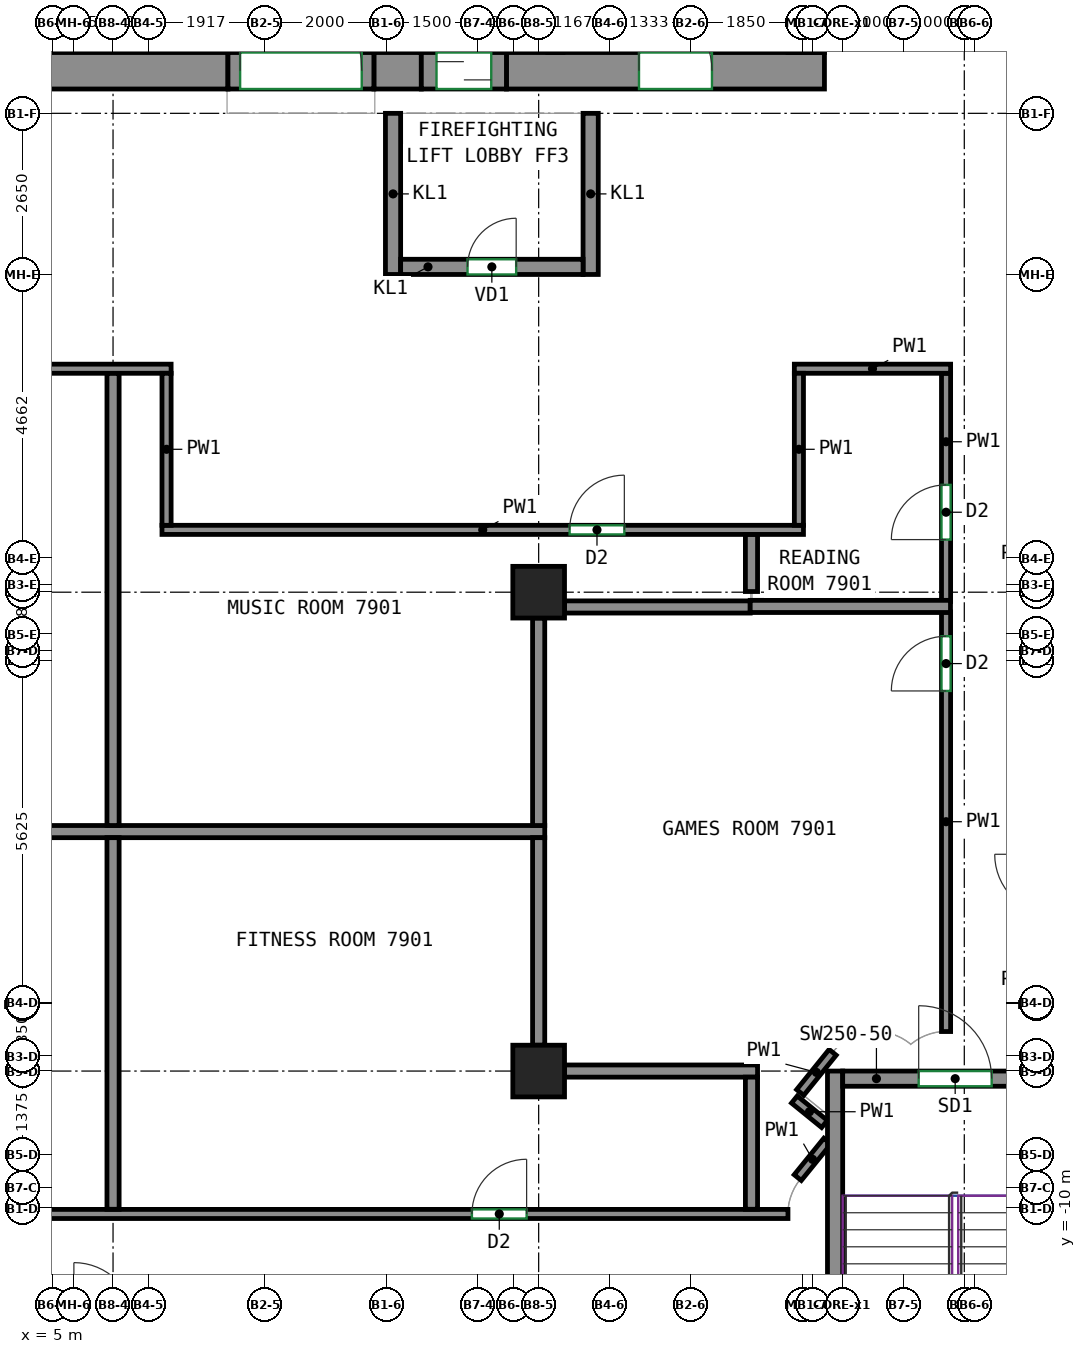
"""IFC4 building model, lengths in metres.
Left out: names, types, materials, properties, quantities, classifications, styles, units other than length and angle.
Written with IfcOpenShell. Run it as: python <this file> out.ifc"""

import sys

from ifc_helpers import new_model, si_unit, direction, frame, frame_2d, origin, origin_2d, place, context, subcontext, project, spatial, rectangle, extrude, source, transform, mapped, element, fill, save


model = new_model("IFC4")
c1 = context("Model", 3, precision=1e-05, world=origin(), true_north=direction((0.0, 1.0)))
c2 = subcontext(c1, "Body", "Model", "MODEL_VIEW")
j1 = project(units=[si_unit("LENGTHUNIT", "METRE"), si_unit("PLANEANGLEUNIT", "RADIAN")], contexts=[c1])
p1 = place(None, origin())
s1 = spatial("IfcSite", under=j1, at=p1, CompositionType="ELEMENT")
p2 = place(p1, origin())
s2 = spatial("IfcBuilding", under=s1, at=p2, CompositionType="ELEMENT")
p3 = place(p2, frame((0.0, 0.0, 315.4)))
s3 = spatial("IfcBuildingStorey", under=s2, at=p3, CompositionType="ELEMENT", Elevation=315.4)
m1 = source(origin(), c2, "Body", "SweptSolid", [
    extrude(rectangle(XDim=0.85, YDim=0.85, at=origin_2d()), origin(), (0.0, 0.0, 1.0), 3.0),
])
for number, where, z_axis, x_axis in (
    (1, (13.0, -7.75, 0.0), (0.0, 0.0, 1.0), (1.0, 0.0, 0.0)),
    (2, (13.0, 0.125, 0.0), (0.0, 0.0, 1.0), (1.0, 0.0, 0.0)),
):
    element("IfcColumn", number, at=place(p3, frame(where, z_axis=z_axis, x_axis=x_axis)), inside=s3, PredefinedType="COLUMN", context=c2, shape_type="MappedRepresentation", body=[
        mapped(m1, transform((0.0, 0.0, 0.0))),
    ])
m2 = source(origin(), c2, "Body", "SweptSolid", [
    extrude(rectangle(XDim=14.18, YDim=0.6, at=frame_2d((7.09, 0.0))), origin(), (0.0, 0.0, 1.0), 3.0),
])
p4 = place(p3, frame((-6.29, 8.7, 0.0), z_axis=(0.0, 0.0, 1.0), x_axis=(1.0, 0.0, 0.0)))
e3 = element("IfcWall", 3, at=p4, inside=s3, PredefinedType="SHEAR", context=c2, shape_type="MappedRepresentation", body=[
    mapped(m2, transform((0.0, 0.0, 0.0))),
])
m3 = source(origin(), c2, "Body", "SweptSolid", [
    extrude(rectangle(XDim=0.78, YDim=0.6, at=frame_2d((0.39, 0.0))), origin(), (0.0, 0.0, 1.0), 3.0),
])
p5 = place(p3, frame((10.29, 8.7, 0.0), z_axis=(0.0, 0.0, 1.0), x_axis=(1.0, 0.0, 0.0)))
e4 = element("IfcWall", 4, at=p5, inside=s3, PredefinedType="SHEAR", context=c2, shape_type="MappedRepresentation", body=[
    mapped(m3, transform((0.0, 0.0, 0.0))),
])
m4 = source(origin(), c2, "Body", "SweptSolid", [
    extrude(rectangle(XDim=5.23, YDim=0.6, at=frame_2d((2.615, 0.0))), origin(), (0.0, 0.0, 1.0), 3.0),
])
p6 = place(p3, frame((12.47, 8.7, 0.0), z_axis=(0.0, 0.0, 1.0), x_axis=(1.0, 0.0, 0.0)))
e5 = element("IfcWall", 5, at=p6, inside=s3, PredefinedType="SHEAR", context=c2, shape_type="MappedRepresentation", body=[
    mapped(m4, transform((0.0, 0.0, 0.0))),
])
p7 = place(p6, frame((2.18, 0.0, 0.0)))
e6 = element("IfcOpeningElement", 6, at=p7, cuts=e5, PredefinedType="OPENING", context=c2, shape_type="SweptSolid", body=[
    extrude(rectangle(XDim=1.2, YDim=2.1, at=frame_2d((0.6, 1.05))), frame((0.0, 0.31, 0.0), z_axis=(0.0, -1.0, 0.0), x_axis=(1.0, 0.0, 0.0)), (0.0, 0.0, 1.0), 0.62),
])
m5 = source(origin(), c2, "Body", "SweptSolid", [
    extrude(rectangle(XDim=8.0, YDim=0.25, at=frame_2d((4.0, 0.0))), origin(), (0.0, 0.0, 1.0), 3.0),
])
p8 = place(p3, frame((17.875, -15.75, 0.0), z_axis=(0.0, 0.0, 1.0), x_axis=(0.0, 1.0, 0.0)))
e7 = element("IfcWall", 7, at=p8, inside=s3, PredefinedType="SHEAR", context=c2, shape_type="MappedRepresentation", body=[
    mapped(m5, transform((0.0, 0.0, 0.0))),
])
m6 = source(origin(), c2, "Body", "SweptSolid", [
    extrude(rectangle(XDim=3.7, YDim=0.25, at=frame_2d((1.85, 0.0))), origin(), (0.0, 0.0, 1.0), 3.0),
])
p9 = place(p3, frame((18.0, -7.875, 0.0), z_axis=(0.0, 0.0, 1.0), x_axis=(1.0, 0.0, 0.0)))
e8 = element("IfcWall", 8, at=p9, inside=s3, PredefinedType="SHEAR", context=c2, shape_type="MappedRepresentation", body=[
    mapped(m6, transform((0.0, 0.0, 0.0))),
])
p10 = place(p9, frame((1.25, 0.0, 0.0)))
e9 = element("IfcOpeningElement", 9, at=p10, cuts=e8, PredefinedType="OPENING", context=c2, shape_type="SweptSolid", body=[
    extrude(rectangle(XDim=1.2, YDim=2.1, at=frame_2d((0.6, 1.05))), frame((0.0, 0.135, 0.0), z_axis=(0.0, -1.0, 0.0), x_axis=(1.0, 0.0, 0.0)), (0.0, 0.0, 1.0), 0.27),
])
m7 = source(origin(), c2, "Body", "SweptSolid", [
    extrude(rectangle(XDim=2.65, YDim=0.25, at=frame_2d((1.325, 0.0))), origin(), (0.0, 0.0, 1.0), 3.0),
])
for number, where, z_axis, x_axis in (
    (10, (10.605, 5.35, 0.0), (0.0, 0.0, 1.0), (0.0, 1.0, 0.0)),
    (11, (13.855, 5.35, 0.0), (0.0, 0.0, 1.0), (0.0, 1.0, 0.0)),
):
    element("IfcWall", number, at=place(p3, frame(where, z_axis=z_axis, x_axis=x_axis)), inside=s3, PredefinedType="PARTITIONING", context=c2, shape_type="MappedRepresentation", body=[
        mapped(m7, transform((0.0, 0.0, 0.0))),
    ])
m8 = source(origin(), c2, "Body", "SweptSolid", [
    extrude(rectangle(XDim=3.0, YDim=0.25, at=frame_2d((1.5, 0.0))), origin(), (0.0, 0.0, 1.0), 3.0),
])
p11 = place(p3, frame((10.73, 5.475, 0.0), z_axis=(0.0, 0.0, 1.0), x_axis=(1.0, 0.0, 0.0)))
e12 = element("IfcWall", 12, at=p11, inside=s3, PredefinedType="PARTITIONING", context=c2, shape_type="MappedRepresentation", body=[
    mapped(m8, transform((0.0, 0.0, 0.0))),
])
p12 = place(p11, frame((1.1, 0.0, 0.0)))
e13 = element("IfcOpeningElement", 13, at=p12, cuts=e12, PredefinedType="OPENING", context=c2, shape_type="SweptSolid", body=[
    extrude(rectangle(XDim=0.8, YDim=2.0, at=frame_2d((0.4, 1.0))), frame((0.0, 0.135, 0.0), z_axis=(0.0, -1.0, 0.0), x_axis=(1.0, 0.0, 0.0)), (0.0, 0.0, 1.0), 0.27),
])
m9 = source(origin(), c2, "Body", "SweptSolid", [
    extrude(rectangle(XDim=2.4, YDim=0.6, at=frame_2d((1.2, 0.0))), origin(), (0.0, 0.0, 1.0), 2.7),
])
p13 = place(p3, frame((7.89, 8.7, 0.0), z_axis=(0.0, 0.0, 1.0), x_axis=(1.0, 0.0, 0.0)))
e14 = element("IfcWall", 14, at=p13, inside=s3, PredefinedType="PARTITIONING", context=c2, shape_type="MappedRepresentation", body=[
    mapped(m9, transform((0.0, 0.0, 0.0))),
])
p14 = place(p13, frame((0.2, 0.0, 0.0)))
e15 = element("IfcOpeningElement", 15, at=p14, cuts=e14, PredefinedType="OPENING", context=c2, shape_type="SweptSolid", body=[
    extrude(rectangle(XDim=2.0, YDim=2.1, at=frame_2d((1.0, 1.05))), frame((0.0, 0.31, 0.0), z_axis=(0.0, -1.0, 0.0), x_axis=(1.0, 0.0, 0.0)), (0.0, 0.0, 1.0), 0.62),
])
m10 = source(origin(), c2, "Body", "SweptSolid", [
    extrude(rectangle(XDim=1.4, YDim=0.6, at=frame_2d((0.7, 0.0))), origin(), (0.0, 0.0, 1.0), 2.7),
])
p15 = place(p3, frame((11.07, 8.7, 0.0), z_axis=(0.0, 0.0, 1.0), x_axis=(1.0, 0.0, 0.0)))
e16 = element("IfcWall", 16, at=p15, inside=s3, PredefinedType="PARTITIONING", context=c2, shape_type="MappedRepresentation", body=[
    mapped(m10, transform((0.0, 0.0, 0.0))),
])
p16 = place(p15, frame((0.25, 0.0, 0.0)))
e17 = element("IfcOpeningElement", 17, at=p16, cuts=e16, PredefinedType="OPENING", context=c2, shape_type="SweptSolid", body=[
    extrude(rectangle(XDim=0.9, YDim=2.1, at=frame_2d((0.45, 1.05))), frame((0.0, 0.31, 0.0), z_axis=(0.0, -1.0, 0.0), x_axis=(1.0, 0.0, 0.0)), (0.0, 0.0, 1.0), 0.62),
])
p17 = place(p3, frame((-13.55, -10.1, 0.0), z_axis=(0.0, 0.0, 1.0), x_axis=(1.0, 0.0, 0.0)))
e18 = element("IfcWall", 18, at=p17, inside=s3, PredefinedType="PARTITIONING", context=c2, shape_type="SweptSolid", body=[
    extrude(rectangle(XDim=30.65, YDim=0.15, at=frame_2d((15.325, 0.0))), origin(), (0.0, 0.0, 1.0), 3.0),
])
p18 = place(p17, frame((13.442, 0.0, 0.0)))
e19 = element("IfcOpeningElement", 19, at=p18, cuts=e18, PredefinedType="OPENING", context=c2, shape_type="SweptSolid", body=[
    extrude(rectangle(XDim=0.9, YDim=2.1, at=frame_2d((0.45, 1.05))), frame((0.0, 0.085, 0.0), z_axis=(0.0, -1.0, 0.0), x_axis=(1.0, 0.0, 0.0)), (0.0, 0.0, 1.0), 0.17),
])
p19 = place(p17, frame((25.452, 0.0, 0.0)))
e20 = element("IfcOpeningElement", 20, at=p19, cuts=e18, PredefinedType="OPENING", context=c2, shape_type="SweptSolid", body=[
    extrude(rectangle(XDim=0.9, YDim=2.1, at=frame_2d((0.45, 1.05))), frame((0.0, 0.085, 0.0), z_axis=(0.0, -1.0, 0.0), x_axis=(1.0, 0.0, 0.0)), (0.0, 0.0, 1.0), 0.17),
])
p20 = place(p3, frame((-2.175, 3.8, 0.0), z_axis=(0.0, 0.0, 1.0), x_axis=(1.0, 0.0, 0.0)))
e21 = element("IfcWall", 21, at=p20, inside=s3, PredefinedType="PARTITIONING", context=c2, shape_type="SweptSolid", body=[
    extrude(rectangle(XDim=9.13, YDim=0.15, at=frame_2d((4.565, 0.0))), origin(), (0.0, 0.0, 1.0), 3.0),
])
p21 = place(p20, frame((0.807, 0.0, 0.0)))
e22 = element("IfcOpeningElement", 22, at=p21, cuts=e21, PredefinedType="OPENING", context=c2, shape_type="SweptSolid", body=[
    extrude(rectangle(XDim=0.9, YDim=2.1, at=frame_2d((0.45, 1.05))), frame((0.0, 0.085, 0.0), z_axis=(0.0, -1.0, 0.0), x_axis=(1.0, 0.0, 0.0)), (0.0, 0.0, 1.0), 0.17),
])
p22 = place(p3, frame((6.805, 1.15, 0.0), z_axis=(0.0, 0.0, 1.0), x_axis=(1.0, 0.0, 0.0)))
e23 = element("IfcWall", 23, at=p22, inside=s3, PredefinedType="PARTITIONING", context=c2, shape_type="SweptSolid", body=[
    extrude(rectangle(XDim=10.55, YDim=0.15, at=frame_2d((5.275, 0.0))), origin(), (0.0, 0.0, 1.0), 3.0),
])
p23 = place(p22, frame((6.704, 0.0, 0.0)))
e24 = element("IfcOpeningElement", 24, at=p23, cuts=e23, PredefinedType="OPENING", context=c2, shape_type="SweptSolid", body=[
    extrude(rectangle(XDim=0.9, YDim=2.1, at=frame_2d((0.45, 1.05))), frame((0.0, 0.085, 0.0), z_axis=(0.0, -1.0, 0.0), x_axis=(1.0, 0.0, 0.0)), (0.0, 0.0, 1.0), 0.17),
])
p24 = place(p3, frame((6.88, 3.725, 0.0), z_axis=(0.0, 0.0, 1.0), x_axis=(0.0, -1.0, 0.0)))
e25 = element("IfcWall", 25, at=p24, inside=s3, PredefinedType="PARTITIONING", context=c2, shape_type="SweptSolid", body=[
    extrude(rectangle(XDim=2.5, YDim=0.15, at=frame_2d((1.25, 0.0))), origin(), (0.0, 0.0, 1.0), 3.0),
])
p25 = place(p3, frame((17.748, -8.902, 0.0), z_axis=(0.0, 0.0, 1.0), x_axis=(-0.630342797145, -0.776316918589, 0.0)))
e26 = element("IfcWall", 26, at=p25, inside=s3, PredefinedType="PARTITIONING", context=c2, shape_type="SweptSolid", body=[
    extrude(rectangle(XDim=0.773, YDim=0.15, at=frame_2d((0.386, 0.0))), origin(), (0.0, 0.0, 1.0), 3.0),
])
p26 = place(p3, frame((17.206, -8.218, 0.0), z_axis=(0.0, 0.0, 1.0), x_axis=(0.776102288291, -0.630607039376, 0.0)))
e27 = element("IfcWall", 27, at=p26, inside=s3, PredefinedType="PARTITIONING", context=c2, shape_type="SweptSolid", body=[
    extrude(rectangle(XDim=0.638, YDim=0.15, at=frame_2d((0.319, 0.0))), origin(), (0.0, 0.0, 1.0), 3.0),
])
p27 = place(p3, frame((17.835, -7.442, 0.0), z_axis=(0.0, 0.0, 1.0), x_axis=(-0.628859024249, -0.777519342281, 0.0)))
e28 = element("IfcWall", 28, at=p27, inside=s3, PredefinedType="PARTITIONING", context=c2, shape_type="SweptSolid", body=[
    extrude(rectangle(XDim=0.849, YDim=0.15, at=frame_2d((0.425, 0.0))), origin(), (0.0, 0.0, 1.0), 3.0),
])
p28 = place(p3, frame((19.7, -7.1, 0.0), z_axis=(0.0, 0.0, 1.0), x_axis=(0.0, 1.0, 0.0)))
e29 = element("IfcWall", 29, at=p28, inside=s3, PredefinedType="PARTITIONING", context=c2, shape_type="SweptSolid", body=[
    extrude(rectangle(XDim=6.901, YDim=0.15, at=frame_2d((3.451, 0.0))), origin(), (0.0, 0.0, 1.0), 3.0),
])
p29 = place(p28, frame((5.601, 0.0, 0.0)))
e30 = element("IfcOpeningElement", 30, at=p29, cuts=e29, PredefinedType="OPENING", context=c2, shape_type="SweptSolid", body=[
    extrude(rectangle(XDim=0.9, YDim=2.1, at=frame_2d((0.45, 1.05))), frame((0.0, 0.085, 0.0), z_axis=(0.0, -1.0, 0.0), x_axis=(1.0, 0.0, 0.0)), (0.0, 0.0, 1.0), 0.17),
])
p30 = place(p3, frame((19.7, -0.028, 0.0), z_axis=(0.0, 0.0, 1.0), x_axis=(0.0, 1.0, 0.0)))
e31 = element("IfcWall", 31, at=p30, inside=s3, PredefinedType="PARTITIONING", context=c2, shape_type="SweptSolid", body=[
    extrude(rectangle(XDim=3.753, YDim=0.15, at=frame_2d((1.876, 0.0))), origin(), (0.0, 0.0, 1.0), 3.0),
])
p31 = place(p30, frame((1.018, 0.0, 0.0)))
e32 = element("IfcOpeningElement", 32, at=p31, cuts=e31, PredefinedType="OPENING", context=c2, shape_type="SweptSolid", body=[
    extrude(rectangle(XDim=0.9, YDim=2.1, at=frame_2d((0.45, 1.05))), frame((0.0, 0.085, 0.0), z_axis=(0.0, -1.0, 0.0), x_axis=(1.0, 0.0, 0.0)), (0.0, 0.0, 1.0), 0.17),
])
p32 = place(p3, frame((17.205, 3.8, 0.0), z_axis=(0.0, 0.0, 1.0), x_axis=(1.0, 0.0, 0.0)))
e33 = element("IfcWall", 33, at=p32, inside=s3, PredefinedType="PARTITIONING", context=c2, shape_type="SweptSolid", body=[
    extrude(rectangle(XDim=2.57, YDim=0.15, at=frame_2d((1.285, 0.0))), origin(), (0.0, 0.0, 1.0), 3.0),
])
p33 = place(p3, frame((17.28, 1.225, 0.0), z_axis=(0.0, 0.0, 1.0), x_axis=(0.0, 1.0, 0.0)))
e34 = element("IfcWall", 34, at=p33, inside=s3, PredefinedType="PARTITIONING", context=c2, shape_type="SweptSolid", body=[
    extrude(rectangle(XDim=2.5, YDim=0.15, at=frame_2d((1.25, 0.0))), origin(), (0.0, 0.0, 1.0), 3.0),
])
p34 = place(p3, frame((-1.1, -3.812, 0.0), z_axis=(0.0, 0.0, 1.0), x_axis=(1.0, 0.0, 0.0)))
e35 = element("IfcWall", 35, at=p34, inside=s3, PredefinedType="PARTITIONING", context=c2, shape_type="SweptSolid", body=[
    extrude(rectangle(XDim=14.2, YDim=0.2, at=frame_2d((7.1, 0.0))), origin(), (0.0, 0.0, 1.0), 3.0),
])
p35 = place(p3, frame((6.0, -3.712, 0.0), z_axis=(0.0, 0.0, 1.0), x_axis=(0.0, 1.0, 0.0)))
e36 = element("IfcWall", 36, at=p35, inside=s3, PredefinedType="PARTITIONING", context=c2, shape_type="SweptSolid", body=[
    extrude(rectangle(XDim=7.435, YDim=0.2, at=frame_2d((3.717, 0.0))), origin(), (0.0, 0.0, 1.0), 3.0),
])
p36 = place(p3, frame((6.0, -10.023, 0.0), z_axis=(0.0, 0.0, 1.0), x_axis=(0.0, 1.0, 0.0)))
e37 = element("IfcWall", 37, at=p36, inside=s3, PredefinedType="PARTITIONING", context=c2, shape_type="SweptSolid", body=[
    extrude(rectangle(XDim=6.111, YDim=0.2, at=frame_2d((3.055, 0.0))), origin(), (0.0, 0.0, 1.0), 3.0),
])
p37 = place(p3, frame((13.0, -7.325, 0.0), z_axis=(0.0, 0.0, 1.0), x_axis=(0.0, 1.0, 0.0)))
e38 = element("IfcWall", 38, at=p37, inside=s3, PredefinedType="PARTITIONING", context=c2, shape_type="SweptSolid", body=[
    extrude(rectangle(XDim=3.413, YDim=0.2, at=frame_2d((1.707, 0.0))), origin(), (0.0, 0.0, 1.0), 3.0),
])
p38 = place(p3, frame((16.6, -7.75, 0.0), z_axis=(0.0, 0.0, 1.0), x_axis=(-1.0, 0.0, 0.0)))
e39 = element("IfcWall", 39, at=p38, inside=s3, PredefinedType="PARTITIONING", context=c2, shape_type="SweptSolid", body=[
    extrude(rectangle(XDim=3.175, YDim=0.2, at=frame_2d((1.587, 0.0))), origin(), (0.0, 0.0, 1.0), 3.0),
])
p39 = place(p3, frame((16.5, -10.023, 0.0), z_axis=(0.0, 0.0, 1.0), x_axis=(0.0, 1.0, 0.0)))
e40 = element("IfcWall", 40, at=p39, inside=s3, PredefinedType="PARTITIONING", context=c2, shape_type="SweptSolid", body=[
    extrude(rectangle(XDim=2.173, YDim=0.2, at=frame_2d((1.086, 0.0))), origin(), (0.0, 0.0, 1.0), 3.0),
])
p40 = place(p3, frame((13.425, -0.118, 0.0), z_axis=(0.0, 0.0, 1.0), x_axis=(1.0, 0.0, 0.0)))
e41 = element("IfcWall", 41, at=p40, inside=s3, PredefinedType="PARTITIONING", context=c2, shape_type="SweptSolid", body=[
    extrude(rectangle(XDim=3.054, YDim=0.2, at=frame_2d((1.527, 0.0))), origin(), (0.0, 0.0, 1.0), 3.0),
])
p41 = place(p3, frame((13.0, -3.712, 0.0), z_axis=(0.0, 0.0, 1.0), x_axis=(0.0, 1.0, 0.0)))
e42 = element("IfcWall", 42, at=p41, inside=s3, PredefinedType="PARTITIONING", context=c2, shape_type="SweptSolid", body=[
    extrude(rectangle(XDim=3.412, YDim=0.2, at=frame_2d((1.706, 0.0))), origin(), (0.0, 0.0, 1.0), 3.0),
])
p42 = place(p3, frame((16.5, 0.136, 0.0), z_axis=(0.0, 0.0, 1.0), x_axis=(0.0, 1.0, 0.0)))
e43 = element("IfcWall", 43, at=p42, inside=s3, PredefinedType="PARTITIONING", context=c2, shape_type="SweptSolid", body=[
    extrude(rectangle(XDim=0.937, YDim=0.2, at=frame_2d((0.469, 0.0))), origin(), (0.0, 0.0, 1.0), 3.0),
])
p43 = place(p3, frame((19.773, -0.109, 0.0), z_axis=(0.0, 0.0, 1.0), x_axis=(-1.0, 0.0, 0.0)))
e44 = element("IfcWall", 44, at=p43, inside=s3, PredefinedType="PARTITIONING", context=c2, shape_type="SweptSolid", body=[
    extrude(rectangle(XDim=3.294, YDim=0.2, at=frame_2d((1.647, 0.0))), origin(), (0.0, 0.0, 1.0), 3.0),
])
p44 = place(p14, origin())
e45 = element("IfcDoor", 45, at=p44, inside=s3, OperationType="DOUBLE_DOOR_SINGLE_SWING", PredefinedType="DOOR", context=c2, shape_type="SweptSolid", body=[
    extrude(rectangle(XDim=2.0, YDim=2.1, at=frame_2d((1.0, 1.05))), frame((0.0, 0.205, 0.0), z_axis=(0.0, -1.0, 0.0), x_axis=(1.0, 0.0, 0.0)), (0.0, 0.0, 1.0), 0.05),
])
fill(e15, e45)
p45 = place(p12, origin())
e46 = element("IfcDoor", 46, at=p45, inside=s3, OperationType="SINGLE_SWING_RIGHT", PredefinedType="DOOR", context=c2, shape_type="SweptSolid", body=[
    extrude(rectangle(XDim=0.8, YDim=2.0, at=frame_2d((0.4, 1.0))), frame((0.0, 0.025, 0.0), z_axis=(0.0, -1.0, 0.0), x_axis=(1.0, 0.0, 0.0)), (0.0, 0.0, 1.0), 0.05),
])
fill(e13, e46)
p46 = place(p16, origin())
e47 = element("IfcDoor", 47, at=p46, inside=s3, OperationType="SLIDING_TO_LEFT", PredefinedType="DOOR", context=c2, shape_type="SweptSolid", body=[
    extrude(rectangle(XDim=0.9, YDim=2.1, at=frame_2d((0.45, 1.05))), frame((0.0, 0.205, 0.0), z_axis=(0.0, -1.0, 0.0), x_axis=(1.0, 0.0, 0.0)), (0.0, 0.0, 1.0), 0.05),
])
fill(e17, e47)
p47 = place(p7, origin())
e48 = element("IfcDoor", 48, at=p47, inside=s3, OperationType="DOUBLE_DOOR_SINGLE_SWING", PredefinedType="DOOR", context=c2, shape_type="SweptSolid", body=[
    extrude(rectangle(XDim=1.2, YDim=2.1, at=frame_2d((0.6, 1.05))), frame((0.0, 0.205, 0.0), z_axis=(0.0, -1.0, 0.0), x_axis=(1.0, 0.0, 0.0)), (0.0, 0.0, 1.0), 0.05),
])
fill(e6, e48)
p48 = place(p10, origin())
e49 = element("IfcDoor", 49, at=p48, inside=s3, OperationType="DOUBLE_DOOR_SINGLE_SWING", PredefinedType="DOOR", context=c2, shape_type="SweptSolid", body=[
    extrude(rectangle(XDim=1.2, YDim=2.1, at=frame_2d((0.6, 1.05))), frame((0.0, 0.025, 0.0), z_axis=(0.0, -1.0, 0.0), x_axis=(1.0, 0.0, 0.0)), (0.0, 0.0, 1.0), 0.05),
])
fill(e9, e49)
p49 = place(p19, origin())
e50 = element("IfcDoor", 50, at=p49, inside=s3, OperationType="SINGLE_SWING_RIGHT", PredefinedType="DOOR", context=c2, shape_type="SweptSolid", body=[
    extrude(rectangle(XDim=0.9, YDim=2.1, at=frame_2d((0.45, 1.05))), frame((0.0, 0.025, 0.0), z_axis=(0.0, -1.0, 0.0), x_axis=(1.0, 0.0, 0.0)), (0.0, 0.0, 1.0), 0.05),
])
fill(e20, e50)
p50 = place(p29, origin())
e51 = element("IfcDoor", 51, at=p50, inside=s3, OperationType="SINGLE_SWING_LEFT", PredefinedType="DOOR", context=c2, shape_type="SweptSolid", body=[
    extrude(rectangle(XDim=0.9, YDim=2.1, at=frame_2d((0.45, 1.05))), frame((0.0, 0.025, 0.0), z_axis=(0.0, -1.0, 0.0), x_axis=(1.0, 0.0, 0.0)), (0.0, 0.0, 1.0), 0.05),
])
fill(e30, e51)
p51 = place(p23, origin())
e52 = element("IfcDoor", 52, at=p51, inside=s3, OperationType="SINGLE_SWING_RIGHT", PredefinedType="DOOR", context=c2, shape_type="SweptSolid", body=[
    extrude(rectangle(XDim=0.9, YDim=2.1, at=frame_2d((0.45, 1.05))), frame((0.0, 0.025, 0.0), z_axis=(0.0, -1.0, 0.0), x_axis=(1.0, 0.0, 0.0)), (0.0, 0.0, 1.0), 0.05),
])
fill(e24, e52)
p52 = place(p31, origin())
e53 = element("IfcDoor", 53, at=p52, inside=s3, OperationType="SINGLE_SWING_LEFT", PredefinedType="DOOR", context=c2, shape_type="SweptSolid", body=[
    extrude(rectangle(XDim=0.9, YDim=2.1, at=frame_2d((0.45, 1.05))), frame((0.0, 0.025, 0.0), z_axis=(0.0, -1.0, 0.0), x_axis=(1.0, 0.0, 0.0)), (0.0, 0.0, 1.0), 0.05),
])
fill(e32, e53)
save(model, sys.argv[1])
